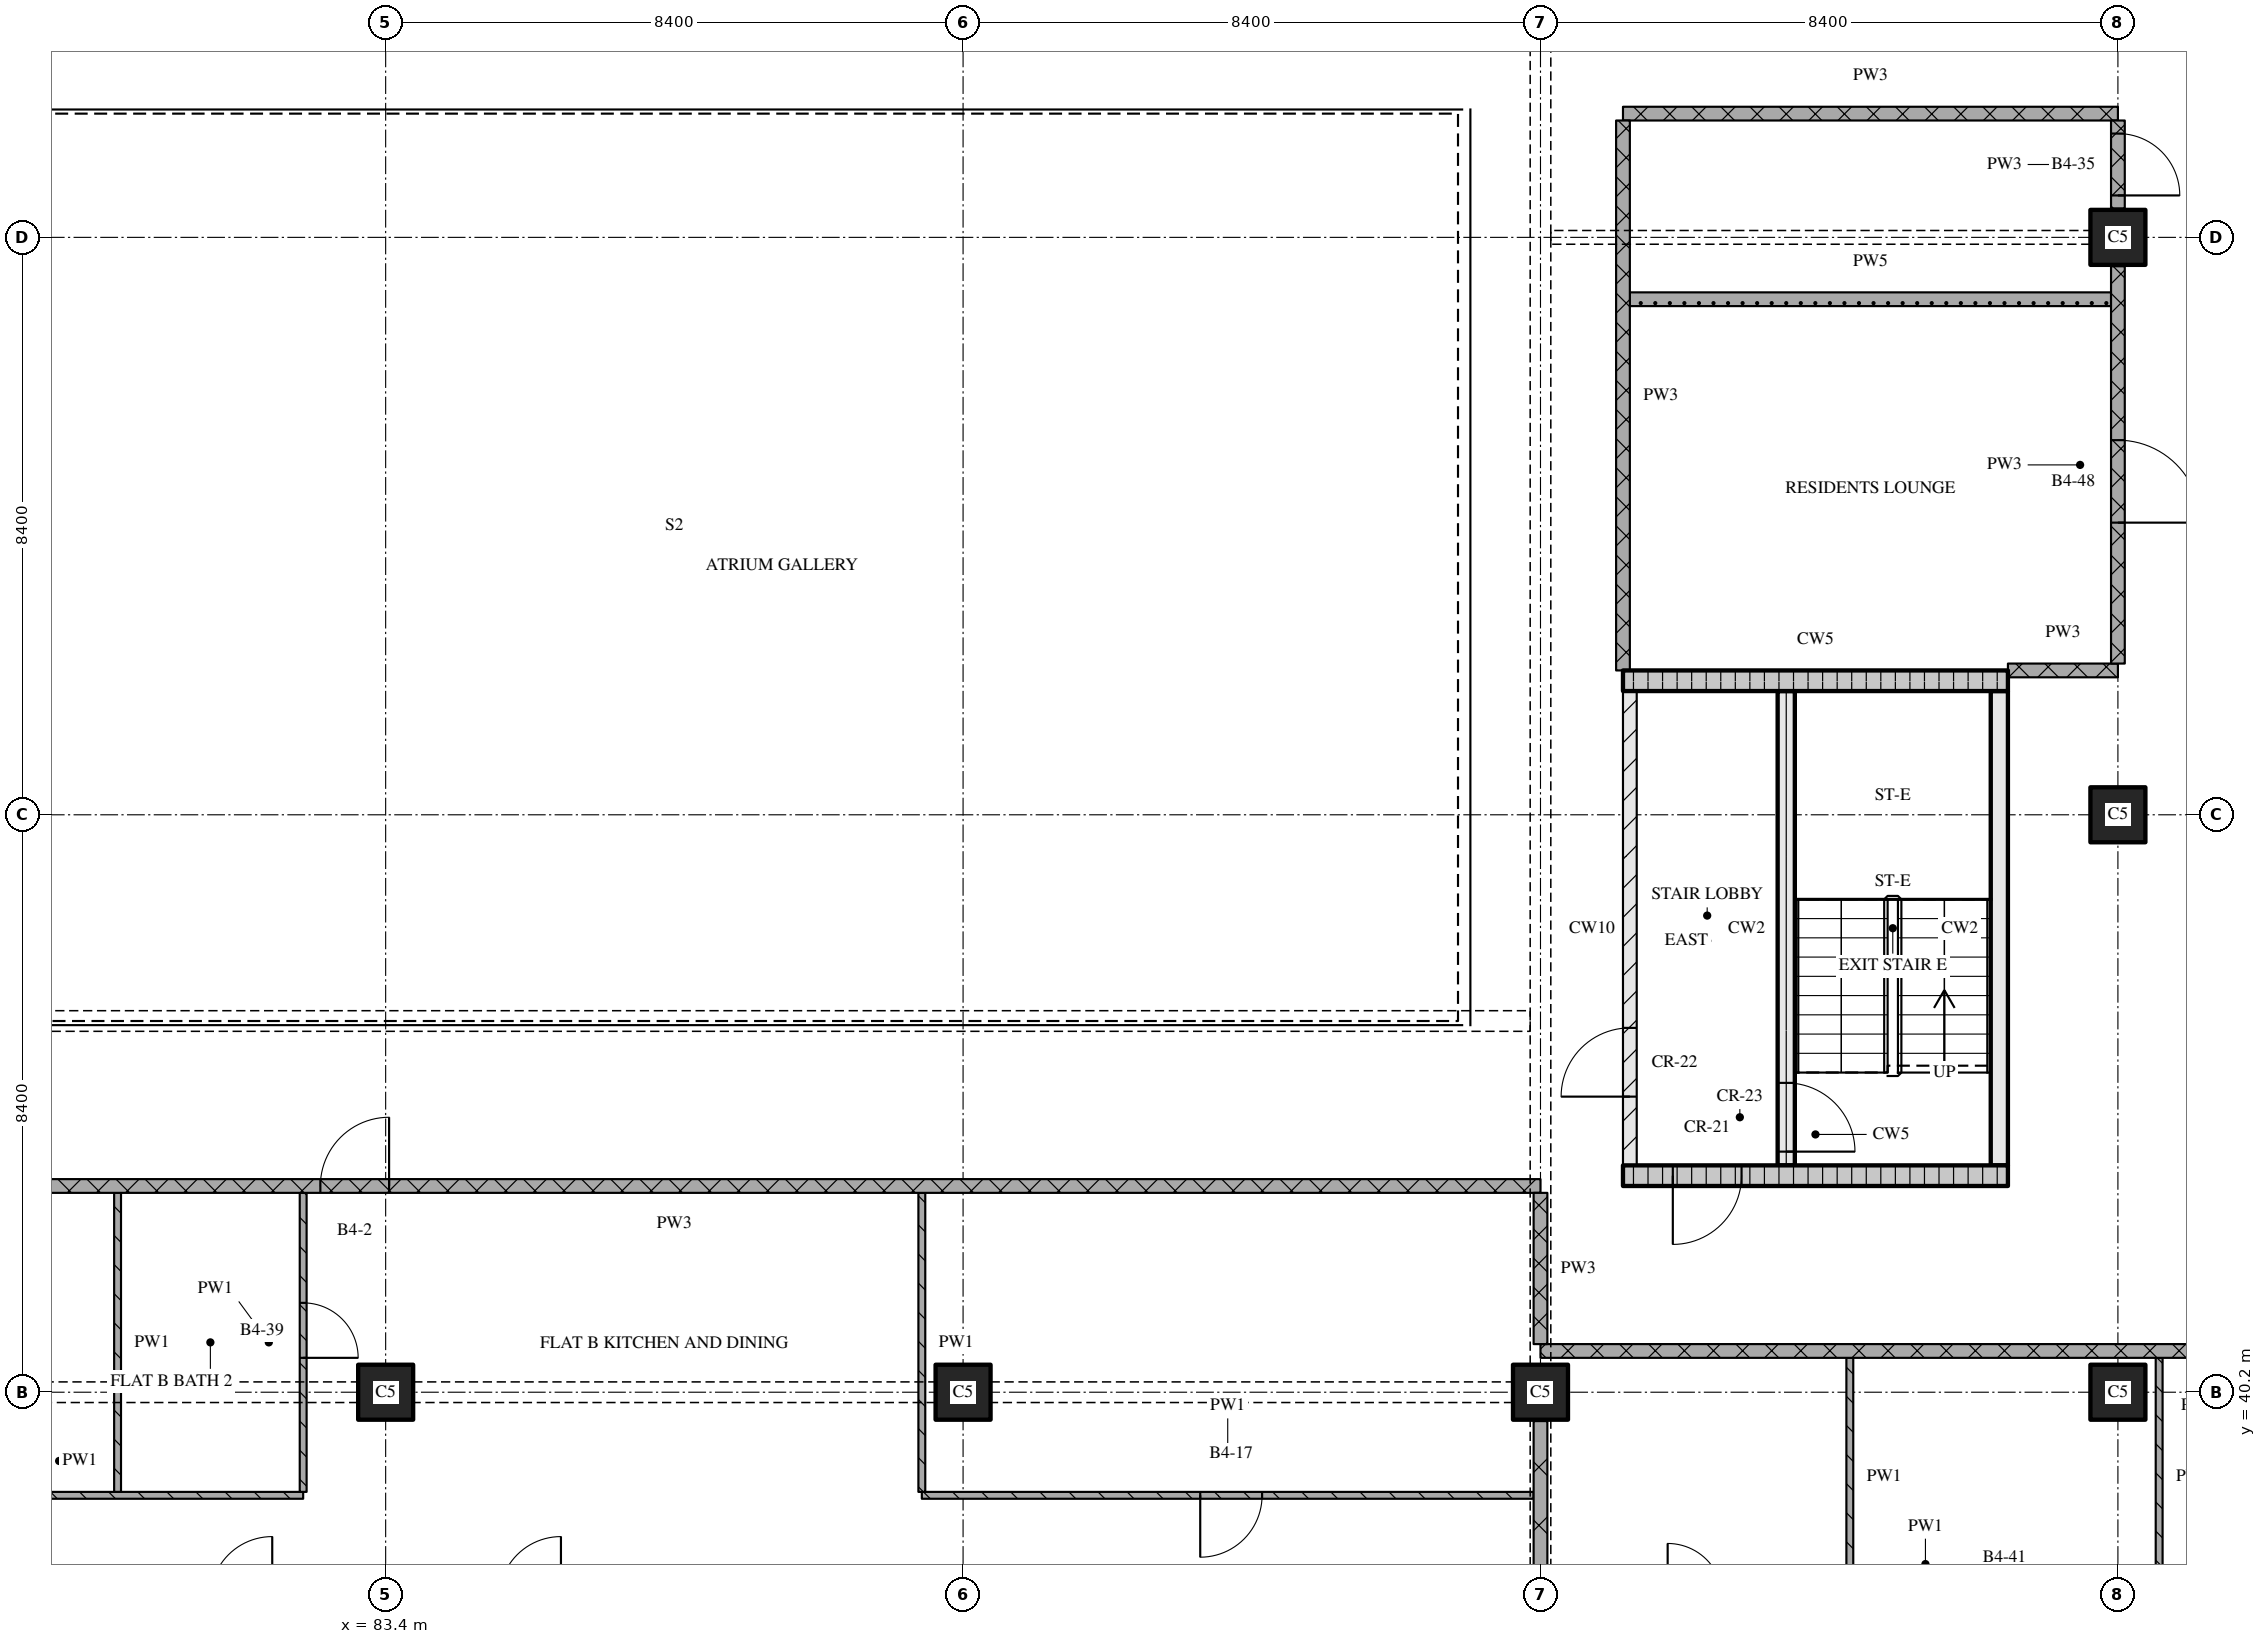
"""IFC4 building model, lengths in metres.
Left out: names, types, materials, properties, quantities, classifications, styles, units other than length and angle.
Written with IfcOpenShell. Run it as: python <this file> out.ifc"""

import sys

from ifc_helpers import new_model, si_unit, direction, frame, frame_2d, origin, origin_2d, place, context, subcontext, project, spatial, rectangle, extrude, element, fill, save


model = new_model("IFC4")
c1 = context("Model", 3, precision=1e-05, world=origin(), true_north=direction((0.0, 1.0)))
c2 = subcontext(c1, "Body", "Model", "MODEL_VIEW")
j1 = project(units=[si_unit("LENGTHUNIT", "METRE"), si_unit("PLANEANGLEUNIT", "RADIAN")], contexts=[c1])
p1 = place(None, origin())
s1 = spatial("IfcSite", under=j1, at=p1, CompositionType="ELEMENT")
p2 = place(p1, origin())
s2 = spatial("IfcBuilding", under=s1, at=p2, CompositionType="ELEMENT")
p3 = place(p2, frame((0.0, 0.0, 131.25)))
s3 = spatial("IfcBuildingStorey", under=s2, at=p3, CompositionType="ELEMENT", Elevation=131.25)
for number, where, z_axis, x_axis in (
    (1, (83.4, 40.2, 0.0), (0.0, 0.0, 1.0), (1.0, 0.0, 0.0)),
    (2, (91.8, 40.2, 0.0), (0.0, 0.0, 1.0), (1.0, 0.0, 0.0)),
    (3, (100.2, 40.2, 0.0), (0.0, 0.0, 1.0), (1.0, 0.0, 0.0)),
    (4, (108.6, 40.2, 0.0), (0.0, 0.0, 1.0), (1.0, 0.0, 0.0)),
    (5, (108.6, 48.6, 0.0), (0.0, 0.0, 1.0), (1.0, 0.0, 0.0)),
    (6, (108.6, 57.0, 0.0), (0.0, 0.0, 1.0), (1.0, 0.0, 0.0)),
):
    element("IfcColumn", number, at=place(p3, frame(where, z_axis=z_axis, x_axis=x_axis)), inside=s3, PredefinedType="COLUMN", context=c2, shape_type="SweptSolid", body=[
        extrude(rectangle(XDim=0.8, YDim=0.8, at=origin_2d()), origin(), (0.0, 0.0, 1.0), 3.6),
    ])
p4 = place(p3, frame((101.4, 43.35, 0.0), z_axis=(0.0, 0.0, 1.0), x_axis=(1.0, 0.0, 0.0)))
e7 = element("IfcWall", 7, at=p4, inside=s3, PredefinedType="SOLIDWALL", context=c2, shape_type="SweptSolid", body=[
    extrude(rectangle(XDim=5.6, YDim=0.3, at=frame_2d((2.8, 0.0))), origin(), (0.0, 0.0, 1.0), 3.32),
])
p5 = place(p4, frame((0.725, 0.0, 0.0)))
e8 = element("IfcOpeningElement", 8, at=p5, cuts=e7, PredefinedType="OPENING", context=c2, shape_type="SweptSolid", body=[
    extrude(rectangle(XDim=1.0, YDim=2.1, at=frame_2d((0.5, 1.05))), frame((0.0, 0.16, 0.0), z_axis=(0.0, -1.0, 0.0), x_axis=(1.0, 0.0, 0.0)), (0.0, 0.0, 1.0), 0.32),
])
p6 = place(p3, frame((101.5, 43.5, 0.0), z_axis=(0.0, 0.0, 1.0), x_axis=(0.0, 1.0, 0.0)))
e9 = element("IfcWall", 9, at=p6, inside=s3, PredefinedType="PARTITIONING", context=c2, shape_type="SweptSolid", body=[
    extrude(rectangle(XDim=6.9, YDim=0.2, at=frame_2d((3.45, 0.0))), origin(), (0.0, 0.0, 1.0), 3.32),
])
p7 = place(p6, frame((1.0, 0.0, 0.0)))
e10 = element("IfcOpeningElement", 10, at=p7, cuts=e9, PredefinedType="OPENING", context=c2, shape_type="SweptSolid", body=[
    extrude(rectangle(XDim=1.0, YDim=2.1, at=frame_2d((0.5, 1.05))), frame((0.0, 0.11, 0.0), z_axis=(0.0, -1.0, 0.0), x_axis=(1.0, 0.0, 0.0)), (0.0, 0.0, 1.0), 0.22),
])
p8 = place(p3, frame((103.775, 43.5, 0.0), z_axis=(0.0, 0.0, 1.0), x_axis=(0.0, 1.0, 0.0)))
e11 = element("IfcWall", 11, at=p8, inside=s3, PredefinedType="SOLIDWALL", context=c2, shape_type="SweptSolid", body=[
    extrude(rectangle(XDim=6.9, YDim=0.25, at=frame_2d((3.45, 0.0))), origin(), (0.0, 0.0, 1.0), 3.32),
])
p9 = place(p8, frame((0.2, 0.0, 0.0)))
e12 = element("IfcOpeningElement", 12, at=p9, cuts=e11, PredefinedType="OPENING", context=c2, shape_type="SweptSolid", body=[
    extrude(rectangle(XDim=1.0, YDim=2.1, at=frame_2d((0.5, 1.05))), frame((0.0, 0.135, 0.0), z_axis=(0.0, -1.0, 0.0), x_axis=(1.0, 0.0, 0.0)), (0.0, 0.0, 1.0), 0.27),
])
p10 = place(p3, frame((106.875, 43.5, 0.0), z_axis=(0.0, 0.0, 1.0), x_axis=(0.0, 1.0, 0.0)))
e13 = element("IfcWall", 13, at=p10, inside=s3, PredefinedType="SOLIDWALL", context=c2, shape_type="SweptSolid", body=[
    extrude(rectangle(XDim=6.9, YDim=0.25, at=frame_2d((3.45, 0.0))), origin(), (0.0, 0.0, 1.0), 3.32),
])
p11 = place(p3, frame((101.4, 50.55, 0.0), z_axis=(0.0, 0.0, 1.0), x_axis=(1.0, 0.0, 0.0)))
e14 = element("IfcWall", 14, at=p11, inside=s3, PredefinedType="SOLIDWALL", context=c2, shape_type="SweptSolid", body=[
    extrude(rectangle(XDim=5.6, YDim=0.3, at=frame_2d((2.8, 0.0))), origin(), (0.0, 0.0, 1.0), 3.32),
])
p12 = place(p3, frame((75.1, 38.7, 0.0), z_axis=(0.0, 0.0, 1.0), x_axis=(1.0, 0.0, 0.0)))
e15 = element("IfcWall", 15, at=p12, inside=s3, PredefinedType="PARTITIONING", context=c2, shape_type="SweptSolid", body=[
    extrude(rectangle(XDim=7.1, YDim=0.1, at=frame_2d((3.55, 0.0))), origin(), (0.0, 0.0, 1.0), 3.32),
])
p13 = place(p12, frame((1.75, 0.0, 0.0)))
e16 = element("IfcOpeningElement", 16, at=p13, cuts=e15, PredefinedType="OPENING", context=c2, shape_type="SweptSolid", body=[
    extrude(rectangle(XDim=0.8, YDim=2.1, at=frame_2d((0.4, 1.05))), frame((0.0, 0.06, 0.0), z_axis=(0.0, -1.0, 0.0), x_axis=(1.0, 0.0, 0.0)), (0.0, 0.0, 1.0), 0.12),
])
p14 = place(p3, frame((91.2, 38.7, 0.0), z_axis=(0.0, 0.0, 1.0), x_axis=(1.0, 0.0, 0.0)))
e17 = element("IfcWall", 17, at=p14, inside=s3, PredefinedType="PARTITIONING", context=c2, shape_type="SweptSolid", body=[
    extrude(rectangle(XDim=8.9, YDim=0.1, at=frame_2d((4.45, 0.0))), origin(), (0.0, 0.0, 1.0), 3.32),
])
p15 = place(p14, frame((4.05, 0.0, 0.0)))
e18 = element("IfcOpeningElement", 18, at=p15, cuts=e17, PredefinedType="OPENING", context=c2, shape_type="SweptSolid", body=[
    extrude(rectangle(XDim=0.9, YDim=2.1, at=frame_2d((0.45, 1.05))), frame((0.0, 0.06, 0.0), z_axis=(0.0, -1.0, 0.0), x_axis=(1.0, 0.0, 0.0)), (0.0, 0.0, 1.0), 0.12),
])
p16 = place(p3, frame((124.38, 40.8, 0.0), z_axis=(0.0, 0.0, 1.0), x_axis=(-1.0, 0.0, 0.0)))
e19 = element("IfcWall", 19, at=p16, inside=s3, PredefinedType="PARTITIONING", context=c2, shape_type="SweptSolid", body=[
    extrude(rectangle(XDim=24.18, YDim=0.2, at=frame_2d((12.09, 0.0))), origin(), (0.0, 0.0, 1.0), 3.32),
])
p17 = place(p16, frame((11.83, 0.0, 0.0)))
e20 = element("IfcOpeningElement", 20, at=p17, cuts=e19, PredefinedType="OPENING", context=c2, shape_type="SweptSolid", body=[
    extrude(rectangle(XDim=1.0, YDim=2.1, at=frame_2d((0.5, 1.05))), frame((0.0, 0.11, 0.0), z_axis=(0.0, -1.0, 0.0), x_axis=(1.0, 0.0, 0.0)), (0.0, 0.0, 1.0), 0.22),
])
p18 = place(p3, frame((100.2, 43.2, 0.0), z_axis=(0.0, 0.0, 1.0), x_axis=(-1.0, 0.0, 0.0)))
e21 = element("IfcWall", 21, at=p18, inside=s3, PredefinedType="PARTITIONING", context=c2, shape_type="SweptSolid", body=[
    extrude(rectangle(XDim=25.2, YDim=0.2, at=frame_2d((12.6, 0.0))), origin(), (0.0, 0.0, 1.0), 3.32),
])
p19 = place(p18, frame((16.75, 0.0, 0.0)))
e22 = element("IfcOpeningElement", 22, at=p19, cuts=e21, PredefinedType="OPENING", context=c2, shape_type="SweptSolid", body=[
    extrude(rectangle(XDim=1.0, YDim=2.1, at=frame_2d((0.5, 1.05))), frame((0.0, 0.11, 0.0), z_axis=(0.0, -1.0, 0.0), x_axis=(1.0, 0.0, 0.0)), (0.0, 0.0, 1.0), 0.22),
])
p20 = place(p3, frame((107.0, 50.7, 0.0), z_axis=(0.0, 0.0, 1.0), x_axis=(1.0, 0.0, 0.0)))
e23 = element("IfcWall", 23, at=p20, inside=s3, PredefinedType="PARTITIONING", context=c2, shape_type="SweptSolid", body=[
    extrude(rectangle(XDim=1.6, YDim=0.2, at=frame_2d((0.8, 0.0))), origin(), (0.0, 0.0, 1.0), 3.32),
])
p21 = place(p3, frame((101.5, 56.1, 0.0), z_axis=(0.0, 0.0, 1.0), x_axis=(1.0, 0.0, 0.0)))
e24 = element("IfcWall", 24, at=p21, inside=s3, PredefinedType="PARTITIONING", context=c2, shape_type="SweptSolid", body=[
    extrude(rectangle(XDim=7.0, YDim=0.2, at=frame_2d((3.5, 0.0))), origin(), (0.0, 0.0, 1.0), 3.32),
])
p22 = place(p3, frame((101.4, 58.8, 0.0), z_axis=(0.0, 0.0, 1.0), x_axis=(1.0, 0.0, 0.0)))
e25 = element("IfcWall", 25, at=p22, inside=s3, PredefinedType="PARTITIONING", context=c2, shape_type="SweptSolid", body=[
    extrude(rectangle(XDim=7.2, YDim=0.2, at=frame_2d((3.6, 0.0))), origin(), (0.0, 0.0, 1.0), 3.32),
])
p23 = place(p3, frame((79.5, 43.1, 0.0), z_axis=(0.0, 0.0, 1.0), x_axis=(0.0, -1.0, 0.0)))
e26 = element("IfcWall", 26, at=p23, inside=s3, PredefinedType="PARTITIONING", context=c2, shape_type="SweptSolid", body=[
    extrude(rectangle(XDim=4.35, YDim=0.1, at=frame_2d((2.175, 0.0))), origin(), (0.0, 0.0, 1.0), 3.32),
])
p24 = place(p3, frame((82.2, 38.75, 0.0), z_axis=(0.0, 0.0, 1.0), x_axis=(0.0, 1.0, 0.0)))
e27 = element("IfcWall", 27, at=p24, inside=s3, PredefinedType="PARTITIONING", context=c2, shape_type="SweptSolid", body=[
    extrude(rectangle(XDim=4.35, YDim=0.1, at=frame_2d((2.175, 0.0))), origin(), (0.0, 0.0, 1.0), 3.32),
])
p25 = place(p24, frame((1.95, 0.0, 0.0)))
e28 = element("IfcOpeningElement", 28, at=p25, cuts=e27, PredefinedType="OPENING", context=c2, shape_type="SweptSolid", body=[
    extrude(rectangle(XDim=0.8, YDim=2.1, at=frame_2d((0.4, 1.05))), frame((0.0, 0.06, 0.0), z_axis=(0.0, -1.0, 0.0), x_axis=(1.0, 0.0, 0.0)), (0.0, 0.0, 1.0), 0.12),
])
p26 = place(p3, frame((91.2, 43.1, 0.0), z_axis=(0.0, 0.0, 1.0), x_axis=(0.0, -1.0, 0.0)))
e29 = element("IfcWall", 29, at=p26, inside=s3, PredefinedType="PARTITIONING", context=c2, shape_type="SweptSolid", body=[
    extrude(rectangle(XDim=4.35, YDim=0.1, at=frame_2d((2.175, 0.0))), origin(), (0.0, 0.0, 1.0), 3.32),
])
p27 = place(p3, frame((100.2, 43.1, 0.0), z_axis=(0.0, 0.0, 1.0), x_axis=(0.0, -1.0, 0.0)))
e30 = element("IfcWall", 30, at=p27, inside=s3, PredefinedType="PARTITIONING", context=c2, shape_type="SweptSolid", body=[
    extrude(rectangle(XDim=2.2, YDim=0.2, at=frame_2d((1.1, 0.0))), origin(), (0.0, 0.0, 1.0), 2.43),
])
p28 = place(p3, frame((100.2, 39.78, 0.0), z_axis=(0.0, 0.0, 1.0), x_axis=(0.0, -1.0, 0.0)))
e31 = element("IfcWall", 31, at=p28, inside=s3, PredefinedType="PARTITIONING", context=c2, shape_type="SweptSolid", body=[
    extrude(rectangle(XDim=7.56, YDim=0.2, at=frame_2d((3.78, 0.0))), origin(), (0.0, 0.0, 1.0), 2.83),
])
p29 = place(p3, frame((101.4, 58.7, 0.0), z_axis=(0.0, 0.0, 1.0), x_axis=(0.0, -1.0, 0.0)))
e32 = element("IfcWall", 32, at=p29, inside=s3, PredefinedType="PARTITIONING", context=c2, shape_type="SweptSolid", body=[
    extrude(rectangle(XDim=8.0, YDim=0.2, at=frame_2d((4.0, 0.0))), origin(), (0.0, 0.0, 1.0), 3.32),
])
p30 = place(p3, frame((104.7, 40.7, 0.0), z_axis=(0.0, 0.0, 1.0), x_axis=(0.0, -1.0, 0.0)))
e33 = element("IfcWall", 33, at=p30, inside=s3, PredefinedType="PARTITIONING", context=c2, shape_type="SweptSolid", body=[
    extrude(rectangle(XDim=3.45, YDim=0.1, at=frame_2d((1.725, 0.0))), origin(), (0.0, 0.0, 1.0), 3.32),
])
p31 = place(p3, frame((108.6, 50.8, 0.0), z_axis=(0.0, 0.0, 1.0), x_axis=(0.0, 1.0, 0.0)))
e34 = element("IfcWall", 34, at=p31, inside=s3, PredefinedType="PARTITIONING", context=c2, shape_type="SweptSolid", body=[
    extrude(rectangle(XDim=5.78, YDim=0.2, at=frame_2d((2.89, 0.0))), origin(), (0.0, 0.0, 1.0), 3.32),
])
p32 = place(p31, frame((2.05, 0.0, 0.0)))
e35 = element("IfcOpeningElement", 35, at=p32, cuts=e34, PredefinedType="OPENING", context=c2, shape_type="SweptSolid", body=[
    extrude(rectangle(XDim=1.2, YDim=2.1, at=frame_2d((0.6, 1.05))), frame((0.0, 0.11, 0.0), z_axis=(0.0, -1.0, 0.0), x_axis=(1.0, 0.0, 0.0)), (0.0, 0.0, 1.0), 0.22),
])
p33 = place(p3, frame((108.6, 57.42, 0.0), z_axis=(0.0, 0.0, 1.0), x_axis=(0.0, 1.0, 0.0)))
e36 = element("IfcWall", 36, at=p33, inside=s3, PredefinedType="PARTITIONING", context=c2, shape_type="SweptSolid", body=[
    extrude(rectangle(XDim=1.28, YDim=0.2, at=frame_2d((0.64, 0.0))), origin(), (0.0, 0.0, 1.0), 3.32),
])
p34 = place(p33, frame((0.19, 0.0, 0.0)))
e37 = element("IfcOpeningElement", 37, at=p34, cuts=e36, PredefinedType="OPENING", context=c2, shape_type="SweptSolid", body=[
    extrude(rectangle(XDim=0.9, YDim=2.1, at=frame_2d((0.45, 1.05))), frame((0.0, 0.11, 0.0), z_axis=(0.0, -1.0, 0.0), x_axis=(1.0, 0.0, 0.0)), (0.0, 0.0, 1.0), 0.22),
])
p35 = place(p3, frame((109.2, 40.7, 0.0), z_axis=(0.0, 0.0, 1.0), x_axis=(0.0, -1.0, 0.0)))
e38 = element("IfcWall", 38, at=p35, inside=s3, PredefinedType="PARTITIONING", context=c2, shape_type="SweptSolid", body=[
    extrude(rectangle(XDim=3.45, YDim=0.1, at=frame_2d((1.725, 0.0))), origin(), (0.0, 0.0, 1.0), 3.32),
])
p36 = place(p5, origin())
e39 = element("IfcDoor", 39, at=p36, inside=s3, OperationType="SINGLE_SWING_RIGHT", PredefinedType="DOOR", context=c2, shape_type="SweptSolid", body=[
    extrude(rectangle(XDim=1.0, YDim=2.1, at=frame_2d((0.5, 1.05))), frame((0.0, 0.025, 0.0), z_axis=(0.0, -1.0, 0.0), x_axis=(1.0, 0.0, 0.0)), (0.0, 0.0, 1.0), 0.05),
])
fill(e8, e39)
p37 = place(p9, origin())
e40 = element("IfcDoor", 40, at=p37, inside=s3, OperationType="SINGLE_SWING_RIGHT", PredefinedType="DOOR", context=c2, shape_type="SweptSolid", body=[
    extrude(rectangle(XDim=1.0, YDim=2.1, at=frame_2d((0.5, 1.05))), frame((0.0, 0.025, 0.0), z_axis=(0.0, -1.0, 0.0), x_axis=(1.0, 0.0, 0.0)), (0.0, 0.0, 1.0), 0.05),
])
fill(e12, e40)
p38 = place(p7, origin())
e41 = element("IfcDoor", 41, at=p38, inside=s3, OperationType="SINGLE_SWING_LEFT", PredefinedType="DOOR", context=c2, shape_type="SweptSolid", body=[
    extrude(rectangle(XDim=1.0, YDim=2.1, at=frame_2d((0.5, 1.05))), frame((0.0, 0.025, 0.0), z_axis=(0.0, -1.0, 0.0), x_axis=(1.0, 0.0, 0.0)), (0.0, 0.0, 1.0), 0.05),
])
fill(e10, e41)
p39 = place(p15, origin())
e42 = element("IfcDoor", 42, at=p39, inside=s3, OperationType="SINGLE_SWING_RIGHT", PredefinedType="DOOR", context=c2, shape_type="SweptSolid", body=[
    extrude(rectangle(XDim=0.9, YDim=2.1, at=frame_2d((0.45, 1.05))), frame((0.0, 0.025, 0.0), z_axis=(0.0, -1.0, 0.0), x_axis=(1.0, 0.0, 0.0)), (0.0, 0.0, 1.0), 0.05),
])
fill(e18, e42)
p40 = place(p19, origin())
e43 = element("IfcDoor", 43, at=p40, inside=s3, OperationType="SINGLE_SWING_RIGHT", PredefinedType="DOOR", context=c2, shape_type="SweptSolid", body=[
    extrude(rectangle(XDim=1.0, YDim=2.1, at=frame_2d((0.5, 1.05))), frame((0.0, 0.025, 0.0), z_axis=(0.0, -1.0, 0.0), x_axis=(1.0, 0.0, 0.0)), (0.0, 0.0, 1.0), 0.05),
])
fill(e22, e43)
p41 = place(p25, origin())
e44 = element("IfcDoor", 44, at=p41, inside=s3, OperationType="SINGLE_SWING_RIGHT", PredefinedType="DOOR", context=c2, shape_type="SweptSolid", body=[
    extrude(rectangle(XDim=0.8, YDim=2.1, at=frame_2d((0.4, 1.05))), frame((0.0, 0.025, 0.0), z_axis=(0.0, -1.0, 0.0), x_axis=(1.0, 0.0, 0.0)), (0.0, 0.0, 1.0), 0.05),
])
fill(e28, e44)
p42 = place(p32, origin())
e45 = element("IfcDoor", 45, at=p42, inside=s3, OperationType="SINGLE_SWING_RIGHT", PredefinedType="DOOR", context=c2, shape_type="SweptSolid", body=[
    extrude(rectangle(XDim=1.2, YDim=2.1, at=frame_2d((0.6, 1.05))), frame((0.0, 0.025, 0.0), z_axis=(0.0, -1.0, 0.0), x_axis=(1.0, 0.0, 0.0)), (0.0, 0.0, 1.0), 0.05),
])
fill(e35, e45)
p43 = place(p34, origin())
e46 = element("IfcDoor", 46, at=p43, inside=s3, OperationType="SINGLE_SWING_RIGHT", PredefinedType="DOOR", context=c2, shape_type="SweptSolid", body=[
    extrude(rectangle(XDim=0.9, YDim=2.1, at=frame_2d((0.45, 1.05))), frame((0.0, 0.025, 0.0), z_axis=(0.0, -1.0, 0.0), x_axis=(1.0, 0.0, 0.0)), (0.0, 0.0, 1.0), 0.05),
])
fill(e37, e46)
save(model, sys.argv[1])
